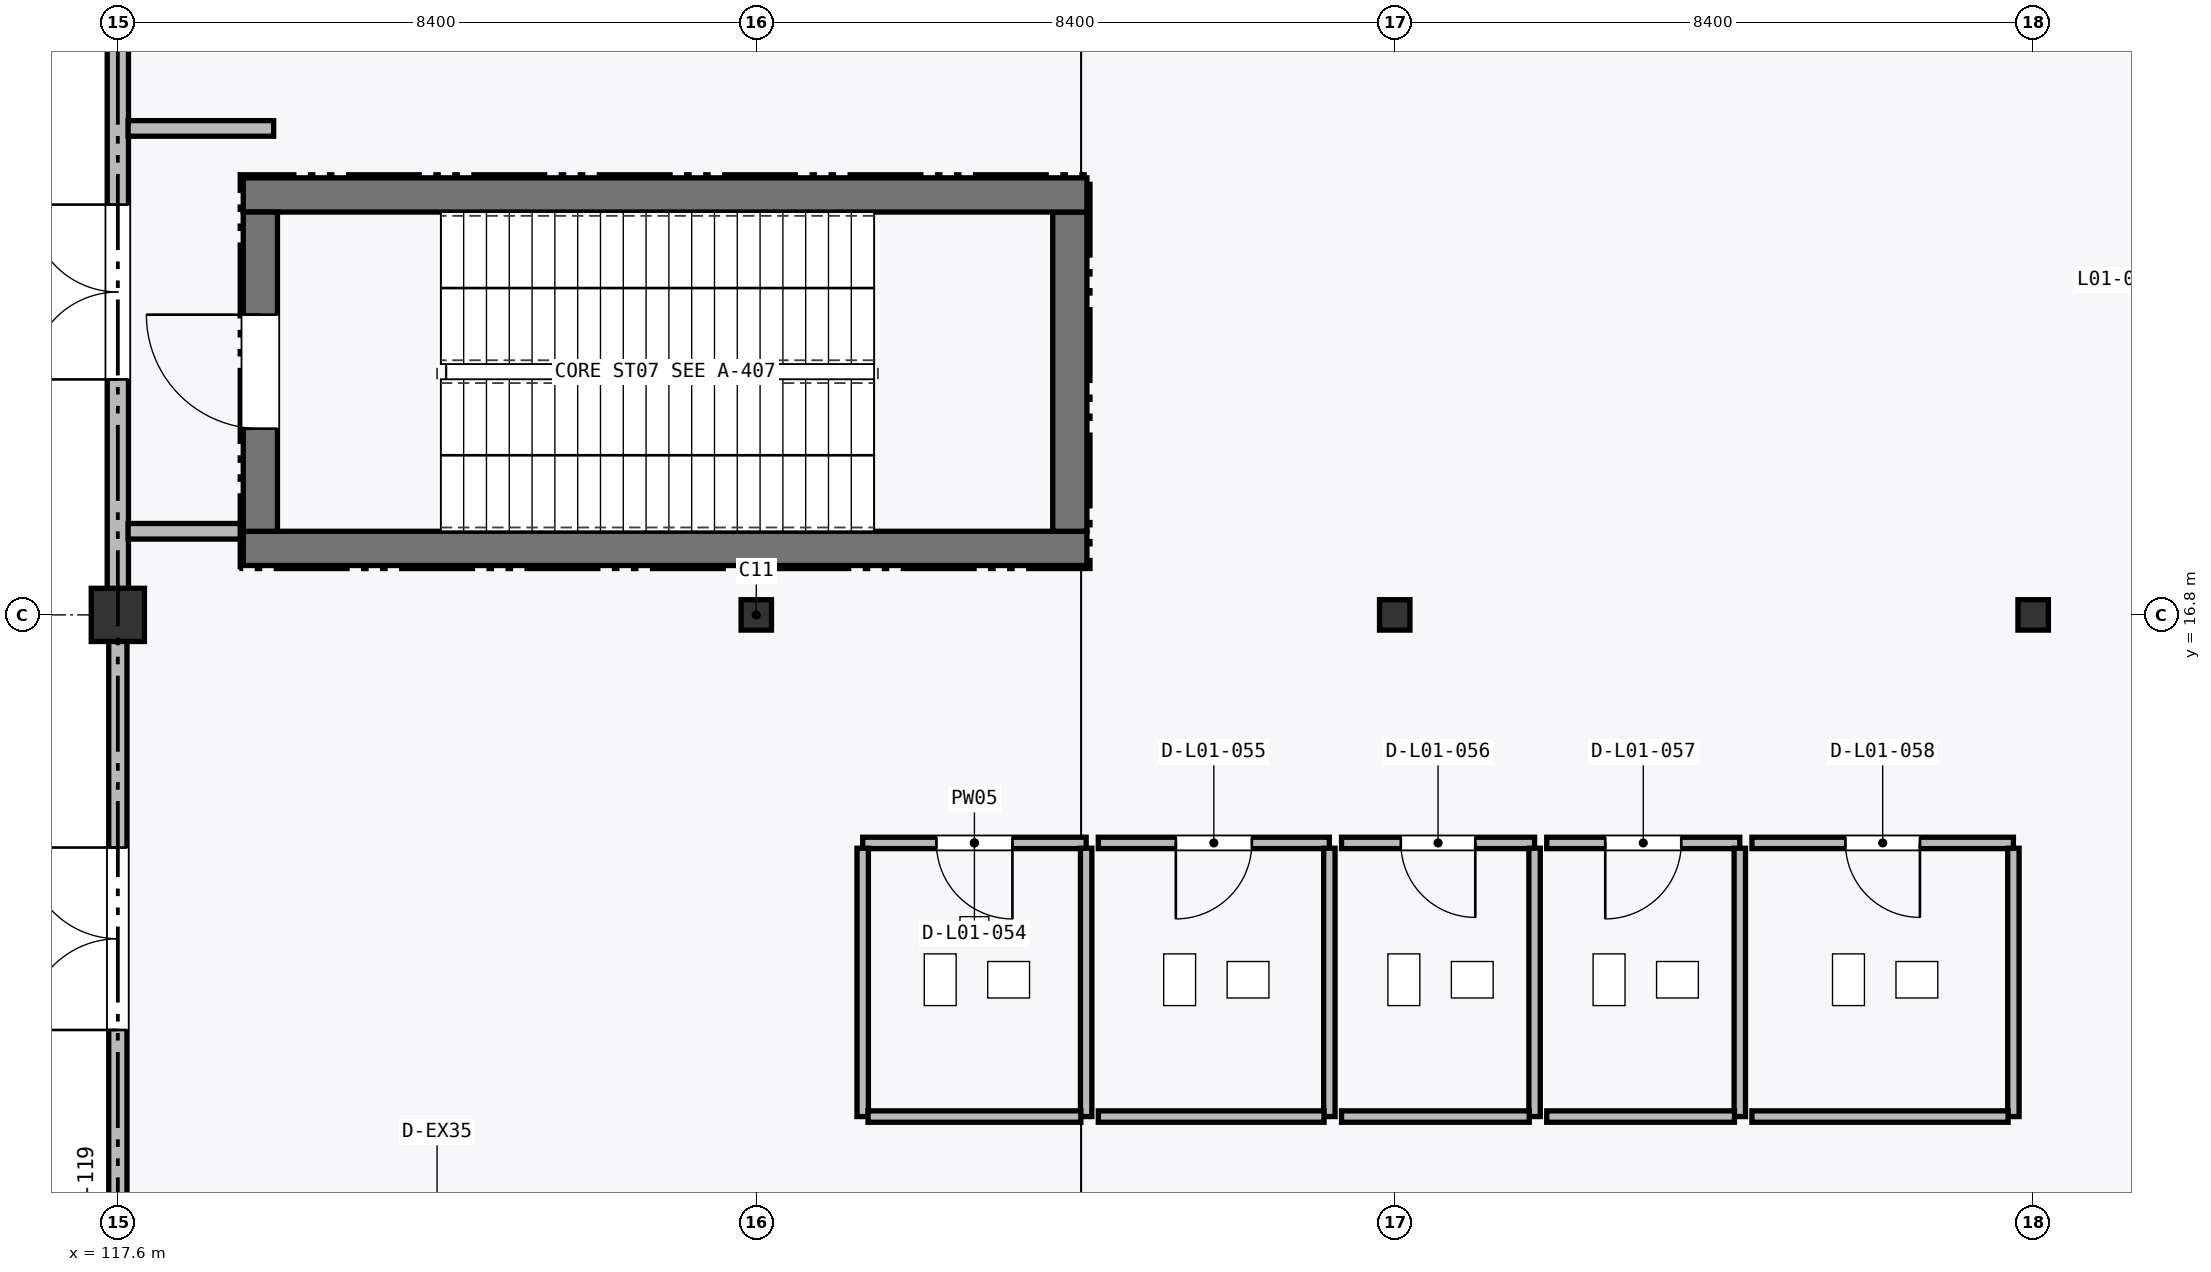
"""IFC4 building model, lengths in metres.
Left out: names, types, materials, properties, quantities, classifications, styles, units other than length and angle.
Written with IfcOpenShell. Run it as: python <this file> out.ifc"""

import sys

from ifc_helpers import new_model, si_unit, direction, frame, frame_2d, origin, origin_2d, place, context, subcontext, project, spatial, rectangle, i_section, extrude, element, fill, save


model = new_model("IFC4")
c1 = context("Model", 3, precision=1e-05, world=origin(), true_north=direction((0.0, 1.0)))
c2 = subcontext(c1, "Body", "Model", "MODEL_VIEW")
j1 = project(units=[si_unit("LENGTHUNIT", "METRE"), si_unit("PLANEANGLEUNIT", "RADIAN")], contexts=[c1])
p1 = place(None, origin())
s1 = spatial("IfcSite", under=j1, at=p1, CompositionType="ELEMENT")
p2 = place(p1, origin())
s2 = spatial("IfcBuilding", under=s1, at=p2, CompositionType="ELEMENT")
p3 = place(p2, origin())
s3 = spatial("IfcBuildingStorey", under=s2, at=p3, CompositionType="ELEMENT", Elevation=0.0)
p4 = place(p3, frame((117.6, 16.8, 0.0), z_axis=(0.0, 0.0, 1.0), x_axis=(1.0, 0.0, 0.0)))
e1 = element("IfcColumn", 1, at=p4, inside=s3, PredefinedType="COLUMN", context=c2, shape_type="SweptSolid", body=[
    extrude(rectangle(XDim=0.7, YDim=0.7, at=origin_2d()), origin(), (0.0, 0.0, 1.0), 6.0),
])
for number, where, z_axis, x_axis in (
    (2, (126.0, 16.8, 0.0), (0.0, 0.0, 1.0), (1.0, 0.0, 0.0)),
    (3, (134.4, 16.8, 0.0), (0.0, 0.0, 1.0), (1.0, 0.0, 0.0)),
    (4, (142.8, 16.8, 0.0), (0.0, 0.0, 1.0), (1.0, 0.0, 0.0)),
):
    element("IfcColumn", number, at=place(p3, frame(where, z_axis=z_axis, x_axis=x_axis)), inside=s3, PredefinedType="COLUMN", context=c2, shape_type="SweptSolid", body=[
        extrude(i_section(OverallWidth=0.4, OverallDepth=0.4, WebThickness=0.013, FlangeThickness=0.021, FilletRadius=0.022, at=origin_2d()), origin(), (0.0, 0.0, 1.0), 6.0),
    ])
p5 = place(p3, frame((117.6, 24.951, 0.0), z_axis=(0.0, 0.0, 1.0), x_axis=(0.0, -1.0, 0.0)))
e5 = element("IfcWall", 5, at=p5, inside=s3, PredefinedType="STANDARD", context=c2, shape_type="SweptSolid", body=[
    extrude(rectangle(XDim=7.806, YDim=0.28, at=frame_2d((3.903, 0.0))), origin(), (0.0, 0.0, 1.0), 5.387),
])
p6 = place(p5, frame((2.753, 0.0, 0.0)))
e6 = element("IfcOpeningElement", 6, at=p6, cuts=e5, PredefinedType="OPENING", context=c2, shape_type="SweptSolid", body=[
    extrude(rectangle(XDim=2.3, YDim=2.4, at=frame_2d((1.15, 1.2))), frame((0.0, 0.15, 0.0), z_axis=(0.0, -1.0, 0.0), x_axis=(1.0, 0.0, 0.0)), (0.0, 0.0, 1.0), 0.3),
])
p7 = place(p3, frame((117.6, 16.455, 0.0), z_axis=(0.0, 0.0, 1.0), x_axis=(0.0, -1.0, 0.0)))
e7 = element("IfcWall", 7, at=p7, inside=s3, PredefinedType="STANDARD", context=c2, shape_type="SweptSolid", body=[
    extrude(rectangle(XDim=7.832, YDim=0.24, at=frame_2d((3.916, 0.0))), origin(), (0.0, 0.0, 1.0), 5.387),
])
p8 = place(p7, frame((2.716, 0.0, 0.0)))
e8 = element("IfcOpeningElement", 8, at=p8, cuts=e7, PredefinedType="OPENING", context=c2, shape_type="SweptSolid", body=[
    extrude(rectangle(XDim=2.4, YDim=2.4, at=frame_2d((1.2, 1.2))), frame((0.0, 0.13, 0.0), z_axis=(0.0, -1.0, 0.0), x_axis=(1.0, 0.0, 0.0)), (0.0, 0.0, 1.0), 0.26),
])
p9 = place(p3, frame((119.25, 17.675, 0.0), z_axis=(0.0, 0.0, 1.0), x_axis=(1.0, 0.0, 0.0)))
e9 = element("IfcWall", 9, at=p9, inside=s3, PredefinedType="SHEAR", context=c2, shape_type="SweptSolid", body=[
    extrude(rectangle(XDim=11.1, YDim=0.45, at=frame_2d((5.55, 0.0))), origin(), (0.0, 0.0, 1.0), 5.745),
])
p10 = place(p3, frame((130.125, 17.9, 0.0), z_axis=(0.0, 0.0, 1.0), x_axis=(0.0, 1.0, 0.0)))
e10 = element("IfcWall", 10, at=p10, inside=s3, PredefinedType="SHEAR", context=c2, shape_type="SweptSolid", body=[
    extrude(rectangle(XDim=4.2, YDim=0.45, at=frame_2d((2.1, 0.0))), origin(), (0.0, 0.0, 1.0), 5.745),
])
p11 = place(p3, frame((130.35, 22.325, 0.0), z_axis=(0.0, 0.0, 1.0), x_axis=(-1.0, 0.0, 0.0)))
e11 = element("IfcWall", 11, at=p11, inside=s3, PredefinedType="SHEAR", context=c2, shape_type="SweptSolid", body=[
    extrude(rectangle(XDim=11.1, YDim=0.45, at=frame_2d((5.55, 0.0))), origin(), (0.0, 0.0, 1.0), 5.745),
])
p12 = place(p3, frame((119.475, 22.1, 0.0), z_axis=(0.0, 0.0, 1.0), x_axis=(0.0, -1.0, 0.0)))
e12 = element("IfcWall", 12, at=p12, inside=s3, PredefinedType="SHEAR", context=c2, shape_type="SweptSolid", body=[
    extrude(rectangle(XDim=4.2, YDim=0.45, at=frame_2d((2.1, 0.0))), origin(), (0.0, 0.0, 1.0), 5.745),
])
p13 = place(p12, frame((1.35, 0.0, 0.0)))
e13 = element("IfcOpeningElement", 13, at=p13, cuts=e12, PredefinedType="OPENING", context=c2, shape_type="SweptSolid", body=[
    extrude(rectangle(XDim=1.5, YDim=2.15, at=frame_2d((0.75, 1.075))), frame((0.0, 0.235, 0.0), z_axis=(0.0, -1.0, 0.0), x_axis=(1.0, 0.0, 0.0)), (0.0, 0.0, 1.0), 0.47),
])
p14 = place(p3, frame((119.65, 23.2, 0.0), z_axis=(0.0, 0.0, 1.0), x_axis=(-1.0, 0.0, 0.0)))
e14 = element("IfcWall", 14, at=p14, inside=s3, PredefinedType="PARTITIONING", context=c2, shape_type="SweptSolid", body=[
    extrude(rectangle(XDim=1.915, YDim=0.205, at=frame_2d((0.958, 0.0))), origin(), (0.0, 0.0, 1.0), 5.745),
])
p15 = place(p3, frame((117.735, 17.9, 0.0), z_axis=(0.0, 0.0, 1.0), x_axis=(1.0, 0.0, 0.0)))
e15 = element("IfcWall", 15, at=p15, inside=s3, PredefinedType="PARTITIONING", context=c2, shape_type="SweptSolid", body=[
    extrude(rectangle(XDim=1.515, YDim=0.205, at=frame_2d((0.757, 0.0))), origin(), (0.0, 0.0, 1.0), 5.745),
])
p16 = place(p3, frame((130.34, 13.8, 0.0), z_axis=(0.0, 0.0, 1.0), x_axis=(-1.0, 0.0, 0.0)))
e16 = element("IfcWall", 16, at=p16, inside=s3, PredefinedType="PARTITIONING", context=c2, shape_type="SweptSolid", body=[
    extrude(rectangle(XDim=2.94, YDim=0.15, at=frame_2d((1.47, 0.0))), origin(), (0.0, 0.0, 1.0), 5.745),
])
p17 = place(p16, frame((0.97, 0.0, 0.0)))
e17 = element("IfcOpeningElement", 17, at=p17, cuts=e16, PredefinedType="OPENING", context=c2, shape_type="SweptSolid", body=[
    extrude(rectangle(XDim=1.0, YDim=2.1, at=frame_2d((0.5, 1.05))), frame((0.0, 0.085, 0.0), z_axis=(0.0, -1.0, 0.0), x_axis=(1.0, 0.0, 0.0)), (0.0, 0.0, 1.0), 0.17),
])
for number, where, z_axis, x_axis in (
    (18, (130.34, 10.2, 0.0), (0.0, 0.0, 1.0), (0.0, 1.0, 0.0)),
    (19, (127.4, 13.73, 0.0), (0.0, 0.0, 1.0), (0.0, -1.0, 0.0)),
):
    element("IfcWall", number, at=place(p3, frame(where, z_axis=z_axis, x_axis=x_axis)), inside=s3, PredefinedType="PARTITIONING", context=c2, shape_type="SweptSolid", body=[
        extrude(rectangle(XDim=3.53, YDim=0.15, at=frame_2d((1.765, 0.0))), origin(), (0.0, 0.0, 1.0), 5.745),
    ])
p18 = place(p3, frame((127.47, 10.2, 0.0), z_axis=(0.0, 0.0, 1.0), x_axis=(1.0, 0.0, 0.0)))
e20 = element("IfcWall", 20, at=p18, inside=s3, PredefinedType="PARTITIONING", context=c2, shape_type="SweptSolid", body=[
    extrude(rectangle(XDim=2.8, YDim=0.15, at=frame_2d((1.4, 0.0))), origin(), (0.0, 0.0, 1.0), 5.745),
])
p19 = place(p3, frame((133.54, 13.8, 0.0), z_axis=(0.0, 0.0, 1.0), x_axis=(-1.0, 0.0, 0.0)))
e21 = element("IfcWall", 21, at=p19, inside=s3, PredefinedType="PARTITIONING", context=c2, shape_type="SweptSolid", body=[
    extrude(rectangle(XDim=3.04, YDim=0.15, at=frame_2d((1.52, 0.0))), origin(), (0.0, 0.0, 1.0), 5.745),
])
p20 = place(p19, frame((1.02, 0.0, 0.0)))
e22 = element("IfcOpeningElement", 22, at=p20, cuts=e21, PredefinedType="OPENING", context=c2, shape_type="SweptSolid", body=[
    extrude(rectangle(XDim=1.0, YDim=2.1, at=frame_2d((0.5, 1.05))), frame((0.0, 0.085, 0.0), z_axis=(0.0, -1.0, 0.0), x_axis=(1.0, 0.0, 0.0)), (0.0, 0.0, 1.0), 0.17),
])
p21 = place(p3, frame((133.54, 10.2, 0.0), z_axis=(0.0, 0.0, 1.0), x_axis=(0.0, 1.0, 0.0)))
e23 = element("IfcWall", 23, at=p21, inside=s3, PredefinedType="PARTITIONING", context=c2, shape_type="SweptSolid", body=[
    extrude(rectangle(XDim=3.53, YDim=0.15, at=frame_2d((1.765, 0.0))), origin(), (0.0, 0.0, 1.0), 5.745),
])
p22 = place(p3, frame((130.5, 10.2, 0.0), z_axis=(0.0, 0.0, 1.0), x_axis=(1.0, 0.0, 0.0)))
e24 = element("IfcWall", 24, at=p22, inside=s3, PredefinedType="PARTITIONING", context=c2, shape_type="SweptSolid", body=[
    extrude(rectangle(XDim=2.97, YDim=0.15, at=frame_2d((1.485, 0.0))), origin(), (0.0, 0.0, 1.0), 5.745),
])
p23 = place(p3, frame((136.24, 13.8, 0.0), z_axis=(0.0, 0.0, 1.0), x_axis=(-1.0, 0.0, 0.0)))
e25 = element("IfcWall", 25, at=p23, inside=s3, PredefinedType="PARTITIONING", context=c2, shape_type="SweptSolid", body=[
    extrude(rectangle(XDim=2.54, YDim=0.15, at=frame_2d((1.27, 0.0))), origin(), (0.0, 0.0, 1.0), 5.745),
])
p24 = place(p23, frame((0.78, 0.0, 0.0)))
e26 = element("IfcOpeningElement", 26, at=p24, cuts=e25, PredefinedType="OPENING", context=c2, shape_type="SweptSolid", body=[
    extrude(rectangle(XDim=0.98, YDim=2.1, at=frame_2d((0.49, 1.05))), frame((0.0, 0.085, 0.0), z_axis=(0.0, -1.0, 0.0), x_axis=(1.0, 0.0, 0.0)), (0.0, 0.0, 1.0), 0.17),
])
p25 = place(p3, frame((136.24, 10.2, 0.0), z_axis=(0.0, 0.0, 1.0), x_axis=(0.0, 1.0, 0.0)))
e27 = element("IfcWall", 27, at=p25, inside=s3, PredefinedType="PARTITIONING", context=c2, shape_type="SweptSolid", body=[
    extrude(rectangle(XDim=3.53, YDim=0.15, at=frame_2d((1.765, 0.0))), origin(), (0.0, 0.0, 1.0), 5.745),
])
p26 = place(p3, frame((133.7, 10.2, 0.0), z_axis=(0.0, 0.0, 1.0), x_axis=(1.0, 0.0, 0.0)))
e28 = element("IfcWall", 28, at=p26, inside=s3, PredefinedType="PARTITIONING", context=c2, shape_type="SweptSolid", body=[
    extrude(rectangle(XDim=2.47, YDim=0.15, at=frame_2d((1.235, 0.0))), origin(), (0.0, 0.0, 1.0), 5.745),
])
p27 = place(p3, frame((138.94, 13.8, 0.0), z_axis=(0.0, 0.0, 1.0), x_axis=(-1.0, 0.0, 0.0)))
e29 = element("IfcWall", 29, at=p27, inside=s3, PredefinedType="PARTITIONING", context=c2, shape_type="SweptSolid", body=[
    extrude(rectangle(XDim=2.54, YDim=0.15, at=frame_2d((1.27, 0.0))), origin(), (0.0, 0.0, 1.0), 5.745),
])
p28 = place(p27, frame((0.77, 0.0, 0.0)))
e30 = element("IfcOpeningElement", 30, at=p28, cuts=e29, PredefinedType="OPENING", context=c2, shape_type="SweptSolid", body=[
    extrude(rectangle(XDim=1.0, YDim=2.1, at=frame_2d((0.5, 1.05))), frame((0.0, 0.085, 0.0), z_axis=(0.0, -1.0, 0.0), x_axis=(1.0, 0.0, 0.0)), (0.0, 0.0, 1.0), 0.17),
])
p29 = place(p3, frame((138.94, 10.2, 0.0), z_axis=(0.0, 0.0, 1.0), x_axis=(0.0, 1.0, 0.0)))
e31 = element("IfcWall", 31, at=p29, inside=s3, PredefinedType="PARTITIONING", context=c2, shape_type="SweptSolid", body=[
    extrude(rectangle(XDim=3.53, YDim=0.15, at=frame_2d((1.765, 0.0))), origin(), (0.0, 0.0, 1.0), 5.745),
])
p30 = place(p3, frame((136.4, 10.2, 0.0), z_axis=(0.0, 0.0, 1.0), x_axis=(1.0, 0.0, 0.0)))
e32 = element("IfcWall", 32, at=p30, inside=s3, PredefinedType="PARTITIONING", context=c2, shape_type="SweptSolid", body=[
    extrude(rectangle(XDim=2.47, YDim=0.15, at=frame_2d((1.235, 0.0))), origin(), (0.0, 0.0, 1.0), 5.745),
])
p31 = place(p3, frame((142.54, 13.8, 0.0), z_axis=(0.0, 0.0, 1.0), x_axis=(-1.0, 0.0, 0.0)))
e33 = element("IfcWall", 33, at=p31, inside=s3, PredefinedType="PARTITIONING", context=c2, shape_type="SweptSolid", body=[
    extrude(rectangle(XDim=3.44, YDim=0.15, at=frame_2d((1.72, 0.0))), origin(), (0.0, 0.0, 1.0), 5.745),
])
p32 = place(p31, frame((1.23, 0.0, 0.0)))
e34 = element("IfcOpeningElement", 34, at=p32, cuts=e33, PredefinedType="OPENING", context=c2, shape_type="SweptSolid", body=[
    extrude(rectangle(XDim=0.98, YDim=2.1, at=frame_2d((0.49, 1.05))), frame((0.0, 0.085, 0.0), z_axis=(0.0, -1.0, 0.0), x_axis=(1.0, 0.0, 0.0)), (0.0, 0.0, 1.0), 0.17),
])
p33 = place(p3, frame((142.54, 10.2, 0.0), z_axis=(0.0, 0.0, 1.0), x_axis=(0.0, 1.0, 0.0)))
e35 = element("IfcWall", 35, at=p33, inside=s3, PredefinedType="PARTITIONING", context=c2, shape_type="SweptSolid", body=[
    extrude(rectangle(XDim=3.53, YDim=0.15, at=frame_2d((1.765, 0.0))), origin(), (0.0, 0.0, 1.0), 4.937),
])
p34 = place(p3, frame((139.1, 10.2, 0.0), z_axis=(0.0, 0.0, 1.0), x_axis=(1.0, 0.0, 0.0)))
e36 = element("IfcWall", 36, at=p34, inside=s3, PredefinedType="PARTITIONING", context=c2, shape_type="SweptSolid", body=[
    extrude(rectangle(XDim=3.37, YDim=0.15, at=frame_2d((1.685, 0.0))), origin(), (0.0, 0.0, 1.0), 5.745),
])
p35 = place(p6, frame((2.3, 0.0, 0.0), z_axis=(0.0, 0.0, 1.0), x_axis=(-1.0, 0.0, 0.0)))
e37 = element("IfcDoor", 37, at=p35, inside=s3, OperationType="DOUBLE_DOOR_SINGLE_SWING", PredefinedType="DOOR", context=c2, shape_type="SweptSolid", body=[
    extrude(rectangle(XDim=2.3, YDim=2.4, at=frame_2d((1.15, 1.2))), frame((0.0, 0.025, 0.0), z_axis=(0.0, -1.0, 0.0), x_axis=(1.0, 0.0, 0.0)), (0.0, 0.0, 1.0), 0.05),
])
fill(e6, e37)
p36 = place(p8, frame((2.4, 0.0, 0.0), z_axis=(0.0, 0.0, 1.0), x_axis=(-1.0, 0.0, 0.0)))
e38 = element("IfcDoor", 38, at=p36, inside=s3, OperationType="DOUBLE_DOOR_SINGLE_SWING", PredefinedType="DOOR", context=c2, shape_type="SweptSolid", body=[
    extrude(rectangle(XDim=2.4, YDim=2.4, at=frame_2d((1.2, 1.2))), frame((0.0, 0.025, 0.0), z_axis=(0.0, -1.0, 0.0), x_axis=(1.0, 0.0, 0.0)), (0.0, 0.0, 1.0), 0.05),
])
fill(e8, e38)
p37 = place(p13, frame((1.5, 0.0, 0.0), z_axis=(0.0, 0.0, 1.0), x_axis=(-1.0, 0.0, 0.0)))
e39 = element("IfcDoor", 39, at=p37, inside=s3, OperationType="SINGLE_SWING_LEFT", PredefinedType="DOOR", context=c2, shape_type="SweptSolid", body=[
    extrude(rectangle(XDim=1.5, YDim=2.15, at=frame_2d((0.75, 1.075))), frame((0.0, 0.025, 0.0), z_axis=(0.0, -1.0, 0.0), x_axis=(1.0, 0.0, 0.0)), (0.0, 0.0, 1.0), 0.05),
])
fill(e13, e39)
p38 = place(p17, origin())
e40 = element("IfcDoor", 40, at=p38, inside=s3, OperationType="SINGLE_SWING_LEFT", PredefinedType="DOOR", context=c2, shape_type="SweptSolid", body=[
    extrude(rectangle(XDim=1.0, YDim=2.1, at=frame_2d((0.5, 1.05))), frame((0.0, 0.025, 0.0), z_axis=(0.0, -1.0, 0.0), x_axis=(1.0, 0.0, 0.0)), (0.0, 0.0, 1.0), 0.05),
])
fill(e17, e40)
p39 = place(p20, origin())
e41 = element("IfcDoor", 41, at=p39, inside=s3, OperationType="SINGLE_SWING_RIGHT", PredefinedType="DOOR", context=c2, shape_type="SweptSolid", body=[
    extrude(rectangle(XDim=1.0, YDim=2.1, at=frame_2d((0.5, 1.05))), frame((0.0, 0.025, 0.0), z_axis=(0.0, -1.0, 0.0), x_axis=(1.0, 0.0, 0.0)), (0.0, 0.0, 1.0), 0.05),
])
fill(e22, e41)
p40 = place(p24, origin())
e42 = element("IfcDoor", 42, at=p40, inside=s3, OperationType="SINGLE_SWING_LEFT", PredefinedType="DOOR", context=c2, shape_type="SweptSolid", body=[
    extrude(rectangle(XDim=0.98, YDim=2.1, at=frame_2d((0.49, 1.05))), frame((0.0, 0.025, 0.0), z_axis=(0.0, -1.0, 0.0), x_axis=(1.0, 0.0, 0.0)), (0.0, 0.0, 1.0), 0.05),
])
fill(e26, e42)
p41 = place(p28, origin())
e43 = element("IfcDoor", 43, at=p41, inside=s3, OperationType="SINGLE_SWING_RIGHT", PredefinedType="DOOR", context=c2, shape_type="SweptSolid", body=[
    extrude(rectangle(XDim=1.0, YDim=2.1, at=frame_2d((0.5, 1.05))), frame((0.0, 0.025, 0.0), z_axis=(0.0, -1.0, 0.0), x_axis=(1.0, 0.0, 0.0)), (0.0, 0.0, 1.0), 0.05),
])
fill(e30, e43)
p42 = place(p32, origin())
e44 = element("IfcDoor", 44, at=p42, inside=s3, OperationType="SINGLE_SWING_LEFT", PredefinedType="DOOR", context=c2, shape_type="SweptSolid", body=[
    extrude(rectangle(XDim=0.98, YDim=2.1, at=frame_2d((0.49, 1.05))), frame((0.0, 0.025, 0.0), z_axis=(0.0, -1.0, 0.0), x_axis=(1.0, 0.0, 0.0)), (0.0, 0.0, 1.0), 0.05),
])
fill(e34, e44)
save(model, sys.argv[1])
